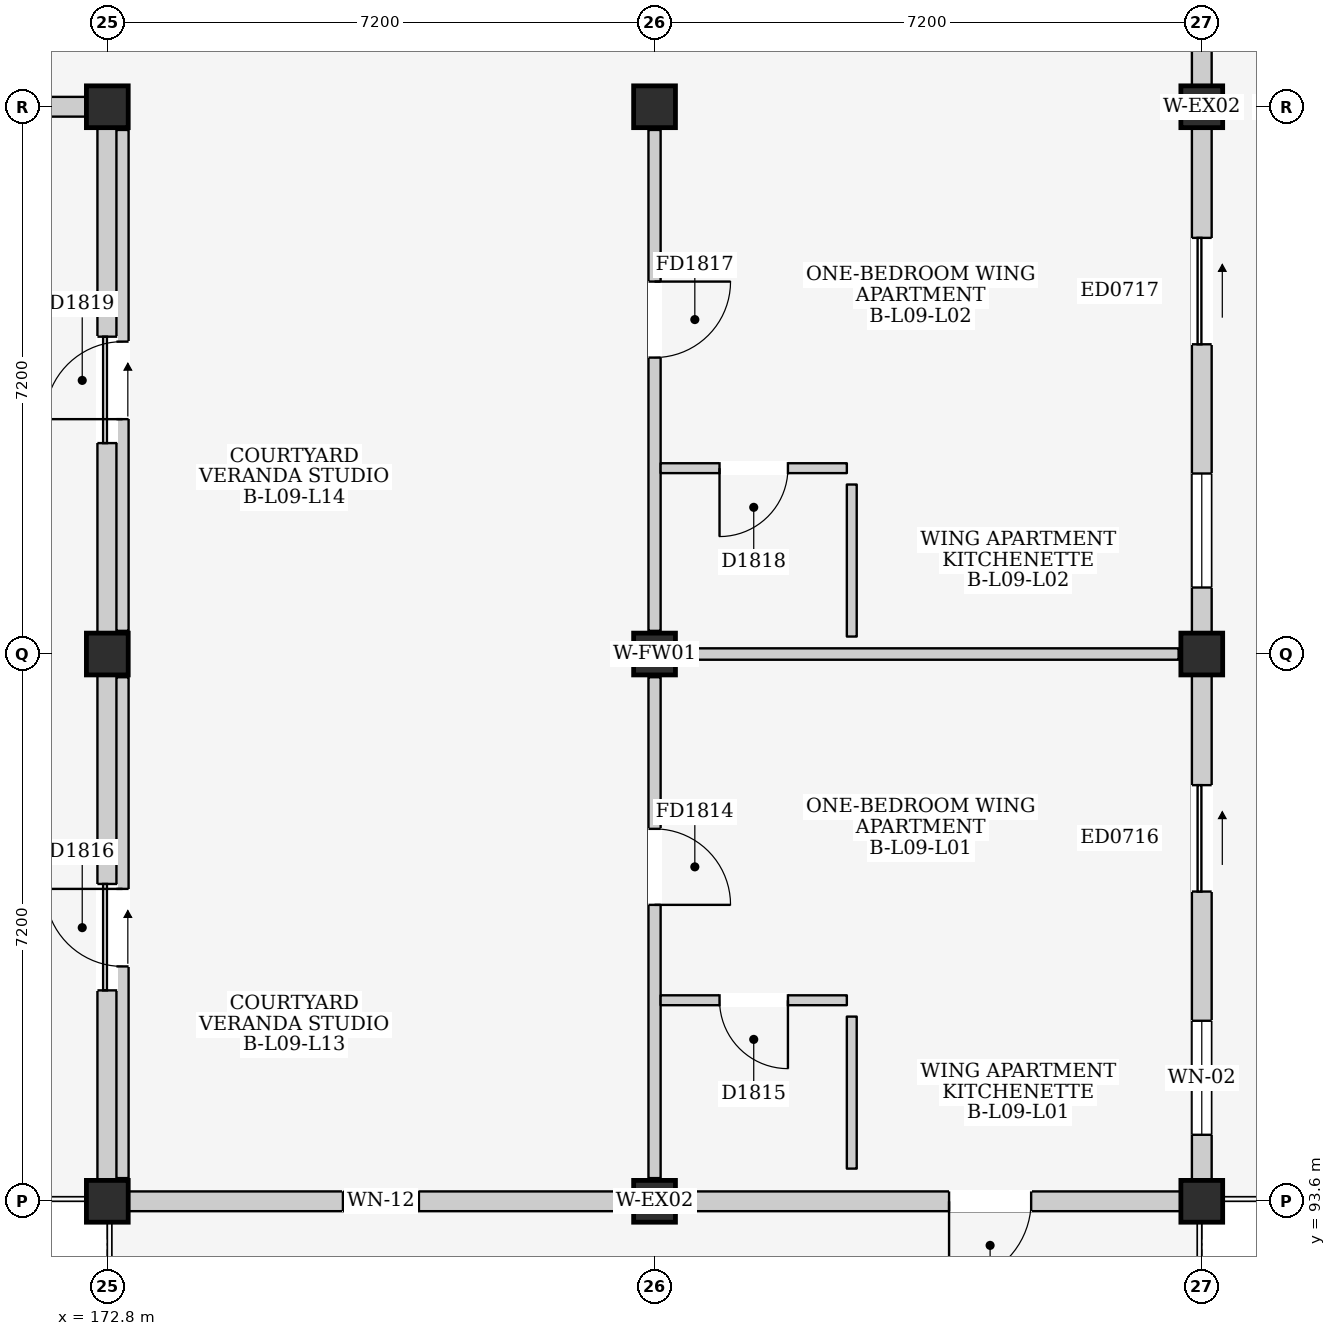
"""IFC4 building model, lengths in metres.
Left out: names, types, materials, properties, quantities, classifications, styles, units other than length and angle.
Written with IfcOpenShell. Run it as: python <this file> out.ifc"""

import sys

from ifc_helpers import new_model, si_unit, direction, frame, frame_2d, origin, origin_2d, place, context, subcontext, project, spatial, rectangle, extrude, element, fill, save


model = new_model("IFC4")
c1 = context("Model", 3, precision=1e-05, world=origin(), true_north=direction((0.0, 1.0)))
c2 = subcontext(c1, "Body", "Model", "MODEL_VIEW")
j1 = project(units=[si_unit("LENGTHUNIT", "METRE"), si_unit("PLANEANGLEUNIT", "RADIAN")], contexts=[c1])
p1 = place(None, origin())
s1 = spatial("IfcSite", under=j1, at=p1, CompositionType="ELEMENT")
p2 = place(p1, origin())
s2 = spatial("IfcBuilding", under=s1, at=p2, CompositionType="ELEMENT")
p3 = place(p2, frame((0.0, 0.0, 31.5)))
s3 = spatial("IfcBuildingStorey", under=s2, at=p3, CompositionType="ELEMENT", Elevation=31.5)
for number, where, z_axis, x_axis in (
    (1, (172.8, 93.6, 0.0), (0.0, 0.0, 1.0), (1.0, 0.0, 0.0)),
    (2, (172.8, 100.8, 0.0), (0.0, 0.0, 1.0), (1.0, 0.0, 0.0)),
    (3, (172.8, 108.0, 0.0), (0.0, 0.0, 1.0), (1.0, 0.0, 0.0)),
    (4, (180.0, 93.6, 0.0), (0.0, 0.0, 1.0), (1.0, 0.0, 0.0)),
    (5, (180.0, 100.8, 0.0), (0.0, 0.0, 1.0), (1.0, 0.0, 0.0)),
    (6, (180.0, 108.0, 0.0), (0.0, 0.0, 1.0), (1.0, 0.0, 0.0)),
    (7, (187.2, 93.6, 0.0), (0.0, 0.0, 1.0), (1.0, 0.0, 0.0)),
    (8, (187.2, 100.8, 0.0), (0.0, 0.0, 1.0), (1.0, 0.0, 0.0)),
    (9, (187.2, 108.0, 0.0), (0.0, 0.0, 1.0), (1.0, 0.0, 0.0)),
):
    element("IfcColumn", number, at=place(p3, frame(where, z_axis=z_axis, x_axis=x_axis)), inside=s3, PredefinedType="COLUMN", context=c2, shape_type="SweptSolid", body=[
        extrude(rectangle(XDim=0.55, YDim=0.55, at=origin_2d()), origin(), (0.0, 0.0, 1.0), 3.3),
    ])
p4 = place(p3, frame((165.875, 108.0, 0.0), z_axis=(0.0, 0.0, 1.0), x_axis=(1.0, 0.0, 0.0)))
e10 = element("IfcWall", 10, at=p4, inside=s3, PredefinedType="ELEMENTEDWALL", context=c2, shape_type="SweptSolid", body=[
    extrude(rectangle(XDim=6.65, YDim=0.26, at=frame_2d((3.325, 0.0))), origin(), (0.0, 0.0, 1.0), 2.465),
])
p5 = place(p4, frame((2.825, 0.0, 1.2)))
e11 = element("IfcOpeningElement", 11, at=p5, cuts=e10, PredefinedType="OPENING", context=c2, shape_type="SweptSolid", body=[
    extrude(rectangle(XDim=1.0, YDim=0.9, at=frame_2d((0.5, 0.45))), frame((0.0, 0.145, 0.0), z_axis=(0.0, -1.0, 0.0), x_axis=(1.0, 0.0, 0.0)), (0.0, 0.0, 1.0), 0.29),
])
p6 = place(p3, frame((173.075, 93.6, 0.0), z_axis=(0.0, 0.0, 1.0), x_axis=(1.0, 0.0, 0.0)))
e12 = element("IfcWall", 12, at=p6, inside=s3, PredefinedType="ELEMENTEDWALL", context=c2, shape_type="SweptSolid", body=[
    extrude(rectangle(XDim=6.65, YDim=0.26, at=frame_2d((3.325, 0.0))), origin(), (0.0, 0.0, 1.0), 2.465),
])
p7 = place(p6, frame((2.825, 0.0, 1.1)))
e13 = element("IfcOpeningElement", 13, at=p7, cuts=e12, PredefinedType="OPENING", context=c2, shape_type="SweptSolid", body=[
    extrude(rectangle(XDim=1.0, YDim=0.9, at=frame_2d((0.5, 0.45))), frame((0.0, 0.145, 0.0), z_axis=(0.0, -1.0, 0.0), x_axis=(1.0, 0.0, 0.0)), (0.0, 0.0, 1.0), 0.29),
])
p8 = place(p3, frame((172.8, 93.875, 0.0), z_axis=(0.0, 0.0, 1.0), x_axis=(0.0, 1.0, 0.0)))
e14 = element("IfcWall", 14, at=p8, inside=s3, PredefinedType="ELEMENTEDWALL", context=c2, shape_type="SweptSolid", body=[
    extrude(rectangle(XDim=6.65, YDim=0.26, at=frame_2d((3.325, 0.0))), origin(), (0.0, 0.0, 1.0), 2.565),
])
p9 = place(p8, frame((2.5, 0.0, 0.0)))
e15 = element("IfcOpeningElement", 15, at=p9, cuts=e14, PredefinedType="OPENING", context=c2, shape_type="SweptSolid", body=[
    extrude(rectangle(XDim=1.4, YDim=2.1, at=frame_2d((0.7, 1.05))), frame((0.0, 0.145, 0.0), z_axis=(0.0, -1.0, 0.0), x_axis=(1.0, 0.0, 0.0)), (0.0, 0.0, 1.0), 0.29),
])
p10 = place(p3, frame((172.8, 101.075, 0.0), z_axis=(0.0, 0.0, 1.0), x_axis=(0.0, 1.0, 0.0)))
e16 = element("IfcWall", 16, at=p10, inside=s3, PredefinedType="ELEMENTEDWALL", context=c2, shape_type="SweptSolid", body=[
    extrude(rectangle(XDim=6.65, YDim=0.26, at=frame_2d((3.325, 0.0))), origin(), (0.0, 0.0, 1.0), 2.565),
])
p11 = place(p10, frame((2.5, 0.0, 0.0)))
e17 = element("IfcOpeningElement", 17, at=p11, cuts=e16, PredefinedType="OPENING", context=c2, shape_type="SweptSolid", body=[
    extrude(rectangle(XDim=1.4, YDim=2.1, at=frame_2d((0.7, 1.05))), frame((0.0, 0.145, 0.0), z_axis=(0.0, -1.0, 0.0), x_axis=(1.0, 0.0, 0.0)), (0.0, 0.0, 1.0), 0.29),
])
p12 = place(p3, frame((180.275, 93.6, 0.0), z_axis=(0.0, 0.0, 1.0), x_axis=(1.0, 0.0, 0.0)))
e18 = element("IfcWall", 18, at=p12, inside=s3, PredefinedType="ELEMENTEDWALL", context=c2, shape_type="SweptSolid", body=[
    extrude(rectangle(XDim=6.65, YDim=0.26, at=frame_2d((3.325, 0.0))), origin(), (0.0, 0.0, 1.0), 2.465),
])
p13 = place(p12, frame((3.6, 0.0, 0.0)))
e19 = element("IfcOpeningElement", 19, at=p13, cuts=e18, PredefinedType="OPENING", context=c2, shape_type="SweptSolid", body=[
    extrude(rectangle(XDim=1.08, YDim=2.12, at=frame_2d((0.54, 1.06))), frame((0.0, 0.145, 0.0), z_axis=(0.0, -1.0, 0.0), x_axis=(1.0, 0.0, 0.0)), (0.0, 0.0, 1.0), 0.29),
])
p14 = place(p3, frame((187.2, 93.875, 0.0), z_axis=(0.0, 0.0, 1.0), x_axis=(0.0, 1.0, 0.0)))
e20 = element("IfcWall", 20, at=p14, inside=s3, PredefinedType="ELEMENTEDWALL", context=c2, shape_type="SweptSolid", body=[
    extrude(rectangle(XDim=6.65, YDim=0.26, at=frame_2d((3.325, 0.0))), origin(), (0.0, 0.0, 1.0), 2.615),
])
p15 = place(p14, frame((3.8, 0.0, 0.0)))
e21 = element("IfcOpeningElement", 21, at=p15, cuts=e20, PredefinedType="OPENING", context=c2, shape_type="SweptSolid", body=[
    extrude(rectangle(XDim=1.4, YDim=2.1, at=frame_2d((0.7, 1.05))), frame((0.0, 0.145, 0.0), z_axis=(0.0, -1.0, 0.0), x_axis=(1.0, 0.0, 0.0)), (0.0, 0.0, 1.0), 0.29),
])
p16 = place(p14, frame((0.6, 0.0, 0.95)))
e22 = element("IfcOpeningElement", 22, at=p16, cuts=e20, PredefinedType="OPENING", context=c2, shape_type="SweptSolid", body=[
    extrude(rectangle(XDim=1.5, YDim=1.5, at=frame_2d((0.75, 0.75))), frame((0.0, 0.145, 0.0), z_axis=(0.0, -1.0, 0.0), x_axis=(1.0, 0.0, 0.0)), (0.0, 0.0, 1.0), 0.29),
])
p17 = place(p3, frame((187.2, 101.075, 0.0), z_axis=(0.0, 0.0, 1.0), x_axis=(0.0, 1.0, 0.0)))
e23 = element("IfcWall", 23, at=p17, inside=s3, PredefinedType="ELEMENTEDWALL", context=c2, shape_type="SweptSolid", body=[
    extrude(rectangle(XDim=6.65, YDim=0.26, at=frame_2d((3.325, 0.0))), origin(), (0.0, 0.0, 1.0), 2.615),
])
p18 = place(p17, frame((3.8, 0.0, 0.0)))
e24 = element("IfcOpeningElement", 24, at=p18, cuts=e23, PredefinedType="OPENING", context=c2, shape_type="SweptSolid", body=[
    extrude(rectangle(XDim=1.4, YDim=2.1, at=frame_2d((0.7, 1.05))), frame((0.0, 0.145, 0.0), z_axis=(0.0, -1.0, 0.0), x_axis=(1.0, 0.0, 0.0)), (0.0, 0.0, 1.0), 0.29),
])
p19 = place(p17, frame((0.6, 0.0, 0.95)))
e25 = element("IfcOpeningElement", 25, at=p19, cuts=e23, PredefinedType="OPENING", context=c2, shape_type="SweptSolid", body=[
    extrude(rectangle(XDim=1.5, YDim=1.5, at=frame_2d((0.75, 0.75))), frame((0.0, 0.145, 0.0), z_axis=(0.0, -1.0, 0.0), x_axis=(1.0, 0.0, 0.0)), (0.0, 0.0, 1.0), 0.29),
])
p20 = place(p3, frame((187.2, 108.275, 0.0), z_axis=(0.0, 0.0, 1.0), x_axis=(0.0, 1.0, 0.0)))
e26 = element("IfcWall", 26, at=p20, inside=s3, PredefinedType="ELEMENTEDWALL", context=c2, shape_type="SweptSolid", body=[
    extrude(rectangle(XDim=6.65, YDim=0.26, at=frame_2d((3.325, 0.0))), origin(), (0.0, 0.0, 1.0), 2.615),
])
p21 = place(p20, frame((3.65, 0.0, 0.0)))
e27 = element("IfcOpeningElement", 27, at=p21, cuts=e26, PredefinedType="OPENING", context=c2, shape_type="SweptSolid", body=[
    extrude(rectangle(XDim=1.4, YDim=2.1, at=frame_2d((0.7, 1.05))), frame((0.0, 0.145, 0.0), z_axis=(0.0, -1.0, 0.0), x_axis=(1.0, 0.0, 0.0)), (0.0, 0.0, 1.0), 0.29),
])
p22 = place(p3, frame((180.0, 93.905, 0.0), z_axis=(0.0, 0.0, 1.0), x_axis=(0.0, 1.0, 0.0)))
e28 = element("IfcWall", 28, at=p22, inside=s3, PredefinedType="PARTITIONING", context=c2, shape_type="SweptSolid", body=[
    extrude(rectangle(XDim=6.59, YDim=0.16, at=frame_2d((3.295, 0.0))), origin(), (0.0, 0.0, 1.0), 2.565),
])
p23 = place(p22, frame((3.595, 0.0, 0.0)))
e29 = element("IfcOpeningElement", 29, at=p23, cuts=e28, PredefinedType="OPENING", context=c2, shape_type="SweptSolid", body=[
    extrude(rectangle(XDim=1.0, YDim=2.15, at=frame_2d((0.5, 1.075))), frame((0.0, 0.095, 0.0), z_axis=(0.0, -1.0, 0.0), x_axis=(1.0, 0.0, 0.0)), (0.0, 0.0, 1.0), 0.19),
])
p24 = place(p3, frame((180.305, 100.8, 0.0), z_axis=(0.0, 0.0, 1.0), x_axis=(1.0, 0.0, 0.0)))
e30 = element("IfcWall", 30, at=p24, inside=s3, PredefinedType="PARTITIONING", context=c2, shape_type="SweptSolid", body=[
    extrude(rectangle(XDim=6.59, YDim=0.15, at=frame_2d((3.295, 0.0))), origin(), (0.0, 0.0, 1.0), 2.465),
])
p25 = place(p3, frame((180.08, 96.245, 0.0), z_axis=(0.0, 0.0, 1.0), x_axis=(1.0, 0.0, 0.0)))
e31 = element("IfcWall", 31, at=p25, inside=s3, PredefinedType="PARTITIONING", context=c2, shape_type="SweptSolid", body=[
    extrude(rectangle(XDim=2.45, YDim=0.13, at=frame_2d((1.225, 0.0))), origin(), (0.0, 0.0, 1.0), 3.08),
])
p26 = place(p25, frame((0.775, 0.0, 0.0)))
e32 = element("IfcOpeningElement", 32, at=p26, cuts=e31, PredefinedType="OPENING", context=c2, shape_type="SweptSolid", body=[
    extrude(rectangle(XDim=0.9, YDim=2.1, at=frame_2d((0.45, 1.05))), frame((0.0, 0.08, 0.0), z_axis=(0.0, -1.0, 0.0), x_axis=(1.0, 0.0, 0.0)), (0.0, 0.0, 1.0), 0.16),
])
p27 = place(p3, frame((182.595, 94.03, 0.0), z_axis=(0.0, 0.0, 1.0), x_axis=(0.0, 1.0, 0.0)))
e33 = element("IfcWall", 33, at=p27, inside=s3, PredefinedType="PARTITIONING", context=c2, shape_type="SweptSolid", body=[
    extrude(rectangle(XDim=2.0, YDim=0.13, at=frame_2d((1.0, 0.0))), origin(), (0.0, 0.0, 1.0), 3.08),
])
p28 = place(p3, frame((173.0, 93.905, 0.0), z_axis=(0.0, 0.0, 1.0), x_axis=(0.0, 1.0, 0.0)))
e34 = element("IfcWall", 34, at=p28, inside=s3, PredefinedType="PARTITIONING", context=c2, shape_type="SweptSolid", body=[
    extrude(rectangle(XDim=6.59, YDim=0.16, at=frame_2d((3.295, 0.0))), origin(), (0.0, 0.0, 1.0), 3.08),
])
p29 = place(p28, frame((2.785, 0.0, 0.0)))
e35 = element("IfcOpeningElement", 35, at=p29, cuts=e34, PredefinedType="OPENING", context=c2, shape_type="SweptSolid", body=[
    extrude(rectangle(XDim=1.02, YDim=2.18, at=frame_2d((0.51, 1.09))), frame((0.0, 0.095, 0.0), z_axis=(0.0, -1.0, 0.0), x_axis=(1.0, 0.0, 0.0)), (0.0, 0.0, 1.0), 0.19),
])
p30 = place(p3, frame((180.0, 101.105, 0.0), z_axis=(0.0, 0.0, 1.0), x_axis=(0.0, 1.0, 0.0)))
e36 = element("IfcWall", 36, at=p30, inside=s3, PredefinedType="PARTITIONING", context=c2, shape_type="SweptSolid", body=[
    extrude(rectangle(XDim=6.59, YDim=0.16, at=frame_2d((3.295, 0.0))), origin(), (0.0, 0.0, 1.0), 2.565),
])
p31 = place(p30, frame((3.595, 0.0, 0.0)))
e37 = element("IfcOpeningElement", 37, at=p31, cuts=e36, PredefinedType="OPENING", context=c2, shape_type="SweptSolid", body=[
    extrude(rectangle(XDim=1.0, YDim=2.15, at=frame_2d((0.5, 1.075))), frame((0.0, 0.095, 0.0), z_axis=(0.0, -1.0, 0.0), x_axis=(1.0, 0.0, 0.0)), (0.0, 0.0, 1.0), 0.19),
])
p32 = place(p3, frame((180.08, 103.245, 0.0), z_axis=(0.0, 0.0, 1.0), x_axis=(1.0, 0.0, 0.0)))
e38 = element("IfcWall", 38, at=p32, inside=s3, PredefinedType="PARTITIONING", context=c2, shape_type="SweptSolid", body=[
    extrude(rectangle(XDim=2.45, YDim=0.13, at=frame_2d((1.225, 0.0))), origin(), (0.0, 0.0, 1.0), 3.08),
])
p33 = place(p32, frame((0.775, 0.0, 0.0)))
e39 = element("IfcOpeningElement", 39, at=p33, cuts=e38, PredefinedType="OPENING", context=c2, shape_type="SweptSolid", body=[
    extrude(rectangle(XDim=0.9, YDim=2.1, at=frame_2d((0.45, 1.05))), frame((0.0, 0.08, 0.0), z_axis=(0.0, -1.0, 0.0), x_axis=(1.0, 0.0, 0.0)), (0.0, 0.0, 1.0), 0.16),
])
p34 = place(p3, frame((182.595, 101.03, 0.0), z_axis=(0.0, 0.0, 1.0), x_axis=(0.0, 1.0, 0.0)))
e40 = element("IfcWall", 40, at=p34, inside=s3, PredefinedType="PARTITIONING", context=c2, shape_type="SweptSolid", body=[
    extrude(rectangle(XDim=2.0, YDim=0.13, at=frame_2d((1.0, 0.0))), origin(), (0.0, 0.0, 1.0), 3.08),
])
p35 = place(p3, frame((173.0, 101.105, 0.0), z_axis=(0.0, 0.0, 1.0), x_axis=(0.0, 1.0, 0.0)))
e41 = element("IfcWall", 41, at=p35, inside=s3, PredefinedType="PARTITIONING", context=c2, shape_type="SweptSolid", body=[
    extrude(rectangle(XDim=6.59, YDim=0.16, at=frame_2d((3.295, 0.0))), origin(), (0.0, 0.0, 1.0), 3.08),
])
p36 = place(p35, frame((2.785, 0.0, 0.0)))
e42 = element("IfcOpeningElement", 42, at=p36, cuts=e41, PredefinedType="OPENING", context=c2, shape_type="SweptSolid", body=[
    extrude(rectangle(XDim=1.02, YDim=2.18, at=frame_2d((0.51, 1.09))), frame((0.0, 0.095, 0.0), z_axis=(0.0, -1.0, 0.0), x_axis=(1.0, 0.0, 0.0)), (0.0, 0.0, 1.0), 0.19),
])
p37 = place(p7, origin())
e43 = element("IfcWindow", 43, at=p37, inside=s3, PartitioningType="SINGLE_PANEL", PredefinedType="WINDOW", context=c2, shape_type="SweptSolid", body=[
    extrude(rectangle(XDim=1.0, YDim=0.9, at=frame_2d((0.5, 0.45))), frame((0.0, 0.03, 0.0), z_axis=(0.0, -1.0, 0.0), x_axis=(1.0, 0.0, 0.0)), (0.0, 0.0, 1.0), 0.06),
])
fill(e13, e43)
p38 = place(p9, frame((1.4, 0.0, 0.0), z_axis=(0.0, 0.0, 1.0), x_axis=(-1.0, 0.0, 0.0)))
e44 = element("IfcDoor", 44, at=p38, inside=s3, OperationType="SLIDING_TO_RIGHT", PredefinedType="DOOR", context=c2, shape_type="SweptSolid", body=[
    extrude(rectangle(XDim=1.4, YDim=2.1, at=frame_2d((0.7, 1.05))), frame((0.0, 0.025, 0.0), z_axis=(0.0, -1.0, 0.0), x_axis=(1.0, 0.0, 0.0)), (0.0, 0.0, 1.0), 0.05),
])
fill(e15, e44)
p39 = place(p11, frame((1.4, 0.0, 0.0), z_axis=(0.0, 0.0, 1.0), x_axis=(-1.0, 0.0, 0.0)))
e45 = element("IfcDoor", 45, at=p39, inside=s3, OperationType="SLIDING_TO_RIGHT", PredefinedType="DOOR", context=c2, shape_type="SweptSolid", body=[
    extrude(rectangle(XDim=1.4, YDim=2.1, at=frame_2d((0.7, 1.05))), frame((0.0, 0.025, 0.0), z_axis=(0.0, -1.0, 0.0), x_axis=(1.0, 0.0, 0.0)), (0.0, 0.0, 1.0), 0.05),
])
fill(e17, e45)
p40 = place(p13, frame((1.08, 0.0, 0.0), z_axis=(0.0, 0.0, 1.0), x_axis=(-1.0, 0.0, 0.0)))
e46 = element("IfcDoor", 46, at=p40, inside=s3, OperationType="SINGLE_SWING_RIGHT", PredefinedType="DOOR", context=c2, shape_type="SweptSolid", body=[
    extrude(rectangle(XDim=1.08, YDim=2.12, at=frame_2d((0.54, 1.06))), frame((0.0, 0.025, 0.0), z_axis=(0.0, -1.0, 0.0), x_axis=(1.0, 0.0, 0.0)), (0.0, 0.0, 1.0), 0.05),
])
fill(e19, e46)
p41 = place(p15, frame((1.4, 0.0, 0.0), z_axis=(0.0, 0.0, 1.0), x_axis=(-1.0, 0.0, 0.0)))
e47 = element("IfcDoor", 47, at=p41, inside=s3, OperationType="SLIDING_TO_RIGHT", PredefinedType="DOOR", context=c2, shape_type="SweptSolid", body=[
    extrude(rectangle(XDim=1.4, YDim=2.1, at=frame_2d((0.7, 1.05))), frame((0.0, 0.025, 0.0), z_axis=(0.0, -1.0, 0.0), x_axis=(1.0, 0.0, 0.0)), (0.0, 0.0, 1.0), 0.05),
])
fill(e21, e47)
p42 = place(p16, origin())
e48 = element("IfcWindow", 48, at=p42, inside=s3, PartitioningType="DOUBLE_PANEL_VERTICAL", PredefinedType="WINDOW", context=c2, shape_type="SweptSolid", body=[
    extrude(rectangle(XDim=1.5, YDim=1.5, at=frame_2d((0.75, 0.75))), frame((0.0, 0.03, 0.0), z_axis=(0.0, -1.0, 0.0), x_axis=(1.0, 0.0, 0.0)), (0.0, 0.0, 1.0), 0.06),
])
fill(e22, e48)
p43 = place(p18, frame((1.4, 0.0, 0.0), z_axis=(0.0, 0.0, 1.0), x_axis=(-1.0, 0.0, 0.0)))
e49 = element("IfcDoor", 49, at=p43, inside=s3, OperationType="SLIDING_TO_RIGHT", PredefinedType="DOOR", context=c2, shape_type="SweptSolid", body=[
    extrude(rectangle(XDim=1.4, YDim=2.1, at=frame_2d((0.7, 1.05))), frame((0.0, 0.025, 0.0), z_axis=(0.0, -1.0, 0.0), x_axis=(1.0, 0.0, 0.0)), (0.0, 0.0, 1.0), 0.05),
])
fill(e24, e49)
p44 = place(p19, origin())
e50 = element("IfcWindow", 50, at=p44, inside=s3, PartitioningType="DOUBLE_PANEL_VERTICAL", PredefinedType="WINDOW", context=c2, shape_type="SweptSolid", body=[
    extrude(rectangle(XDim=1.5, YDim=1.5, at=frame_2d((0.75, 0.75))), frame((0.0, 0.03, 0.0), z_axis=(0.0, -1.0, 0.0), x_axis=(1.0, 0.0, 0.0)), (0.0, 0.0, 1.0), 0.06),
])
fill(e25, e50)
p45 = place(p23, frame((1.0, 0.0, 0.0), z_axis=(0.0, 0.0, 1.0), x_axis=(-1.0, 0.0, 0.0)))
e51 = element("IfcDoor", 51, at=p45, inside=s3, OperationType="SINGLE_SWING_RIGHT", PredefinedType="DOOR", context=c2, shape_type="SweptSolid", body=[
    extrude(rectangle(XDim=1.0, YDim=2.15, at=frame_2d((0.5, 1.075))), frame((0.0, 0.025, 0.0), z_axis=(0.0, -1.0, 0.0), x_axis=(1.0, 0.0, 0.0)), (0.0, 0.0, 1.0), 0.05),
])
fill(e29, e51)
p46 = place(p26, frame((0.9, 0.0, 0.0), z_axis=(0.0, 0.0, 1.0), x_axis=(-1.0, 0.0, 0.0)))
e52 = element("IfcDoor", 52, at=p46, inside=s3, OperationType="SINGLE_SWING_LEFT", PredefinedType="DOOR", context=c2, shape_type="SweptSolid", body=[
    extrude(rectangle(XDim=0.9, YDim=2.1, at=frame_2d((0.45, 1.05))), frame((0.0, 0.025, 0.0), z_axis=(0.0, -1.0, 0.0), x_axis=(1.0, 0.0, 0.0)), (0.0, 0.0, 1.0), 0.05),
])
fill(e32, e52)
p47 = place(p29, origin())
e53 = element("IfcDoor", 53, at=p47, inside=s3, OperationType="SINGLE_SWING_RIGHT", PredefinedType="DOOR", context=c2, shape_type="SweptSolid", body=[
    extrude(rectangle(XDim=1.02, YDim=2.18, at=frame_2d((0.51, 1.09))), frame((0.0, 0.025, 0.0), z_axis=(0.0, -1.0, 0.0), x_axis=(1.0, 0.0, 0.0)), (0.0, 0.0, 1.0), 0.05),
])
fill(e35, e53)
p48 = place(p31, frame((1.0, 0.0, 0.0), z_axis=(0.0, 0.0, 1.0), x_axis=(-1.0, 0.0, 0.0)))
e54 = element("IfcDoor", 54, at=p48, inside=s3, OperationType="SINGLE_SWING_LEFT", PredefinedType="DOOR", context=c2, shape_type="SweptSolid", body=[
    extrude(rectangle(XDim=1.0, YDim=2.15, at=frame_2d((0.5, 1.075))), frame((0.0, 0.025, 0.0), z_axis=(0.0, -1.0, 0.0), x_axis=(1.0, 0.0, 0.0)), (0.0, 0.0, 1.0), 0.05),
])
fill(e37, e54)
p49 = place(p33, frame((0.9, 0.0, 0.0), z_axis=(0.0, 0.0, 1.0), x_axis=(-1.0, 0.0, 0.0)))
e55 = element("IfcDoor", 55, at=p49, inside=s3, OperationType="SINGLE_SWING_RIGHT", PredefinedType="DOOR", context=c2, shape_type="SweptSolid", body=[
    extrude(rectangle(XDim=0.9, YDim=2.1, at=frame_2d((0.45, 1.05))), frame((0.0, 0.025, 0.0), z_axis=(0.0, -1.0, 0.0), x_axis=(1.0, 0.0, 0.0)), (0.0, 0.0, 1.0), 0.05),
])
fill(e39, e55)
p50 = place(p36, origin())
e56 = element("IfcDoor", 56, at=p50, inside=s3, OperationType="SINGLE_SWING_LEFT", PredefinedType="DOOR", context=c2, shape_type="SweptSolid", body=[
    extrude(rectangle(XDim=1.02, YDim=2.18, at=frame_2d((0.51, 1.09))), frame((0.0, 0.025, 0.0), z_axis=(0.0, -1.0, 0.0), x_axis=(1.0, 0.0, 0.0)), (0.0, 0.0, 1.0), 0.05),
])
fill(e42, e56)
save(model, sys.argv[1])
